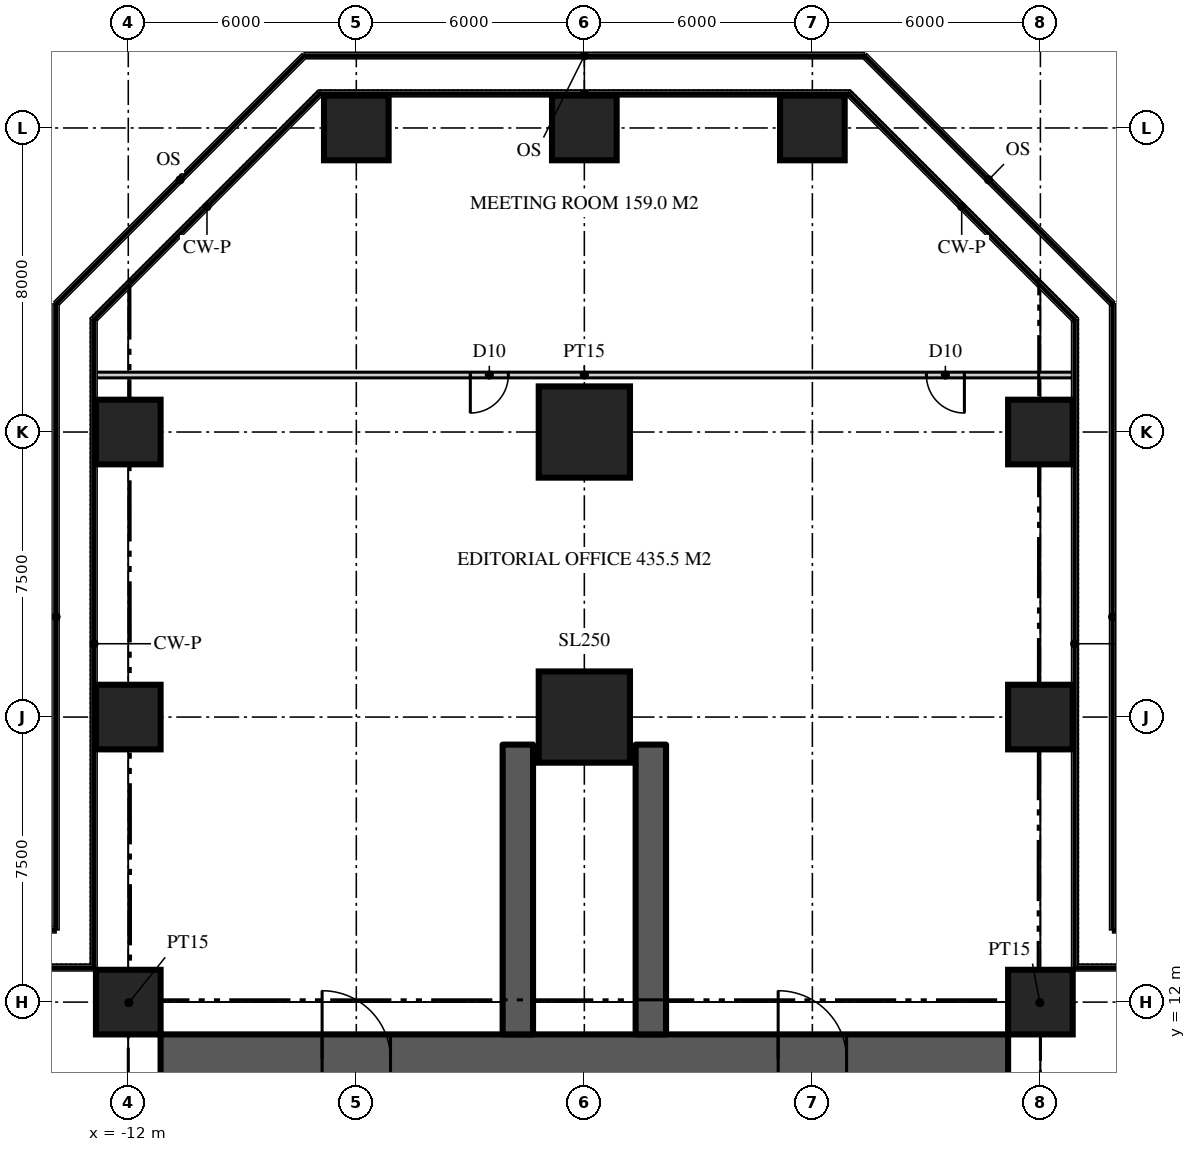
"""IFC4 building model, lengths in metres.
Left out: names, types, materials, properties, quantities, classifications, styles, units other than length and angle.
Written with IfcOpenShell. Run it as: python <this file> out.ifc"""

import sys

from ifc_helpers import new_model, si_unit, direction, frame, frame_2d, origin, origin_2d, place, context, subcontext, project, spatial, rectangle, extrude, element, fill, save


model = new_model("IFC4")
c1 = context("Model", 3, precision=1e-05, world=origin(), true_north=direction((0.0, 1.0)))
c2 = subcontext(c1, "Body", "Model", "MODEL_VIEW")
j1 = project(units=[si_unit("LENGTHUNIT", "METRE"), si_unit("PLANEANGLEUNIT", "RADIAN")], contexts=[c1])
p1 = place(None, origin())
s1 = spatial("IfcSite", under=j1, at=p1, CompositionType="ELEMENT")
p2 = place(p1, origin())
s2 = spatial("IfcBuilding", under=s1, at=p2, CompositionType="ELEMENT")
p3 = place(p2, frame((0.0, 0.0, 28.0)))
s3 = spatial("IfcBuildingStorey", under=s2, at=p3, CompositionType="ELEMENT", Elevation=28.0)
p4 = place(p3, frame((-11.15, 10.5, 0.0), z_axis=(0.0, 0.0, 1.0), x_axis=(1.0, 0.0, 0.0)))
e1 = element("IfcWall", 1, at=p4, inside=s3, PredefinedType="SHEAR", context=c2, shape_type="SweptSolid", body=[
    extrude(rectangle(XDim=22.3, YDim=1.3, at=frame_2d((11.15, 0.0))), origin(), (0.0, 0.0, 1.0), 5.0),
])
p5 = place(p4, frame((4.25, 0.0, 0.0)))
e2 = element("IfcOpeningElement", 2, at=p5, cuts=e1, PredefinedType="OPENING", context=c2, shape_type="SweptSolid", body=[
    extrude(rectangle(XDim=1.8, YDim=2.2, at=frame_2d((0.9, 1.1))), frame((0.0, 0.66, 0.0), z_axis=(0.0, -1.0, 0.0), x_axis=(1.0, 0.0, 0.0)), (0.0, 0.0, 1.0), 1.32),
])
p6 = place(p4, frame((16.25, 0.0, 0.0)))
e3 = element("IfcOpeningElement", 3, at=p6, cuts=e1, PredefinedType="OPENING", context=c2, shape_type="SweptSolid", body=[
    extrude(rectangle(XDim=1.8, YDim=2.2, at=frame_2d((0.9, 1.1))), frame((0.0, 0.66, 0.0), z_axis=(0.0, -1.0, 0.0), x_axis=(1.0, 0.0, 0.0)), (0.0, 0.0, 1.0), 1.32),
])
for number, where, z_axis, x_axis in (
    (4, (1.75, 11.15, 0.0), (0.0, 0.0, 1.0), (0.0, 1.0, 0.0)),
    (5, (-1.75, 11.15, 0.0), (0.0, 0.0, 1.0), (0.0, 1.0, 0.0)),
):
    element("IfcWall", number, at=place(p3, frame(where, z_axis=z_axis, x_axis=x_axis)), inside=s3, PredefinedType="SHEAR", context=c2, shape_type="SweptSolid", body=[
        extrude(rectangle(XDim=7.625, YDim=0.8, at=frame_2d((3.812, 0.0))), origin(), (0.0, 0.0, 1.0), 5.0),
    ])
for number, where, z_axis, x_axis in (
    (6, (-12.0, 12.0, 0.0), (0.0, 0.0, 1.0), (1.0, 0.0, 0.0)),
    (7, (12.0, 12.0, 0.0), (0.0, 0.0, 1.0), (1.0, 0.0, 0.0)),
    (8, (-12.0, 19.5, 0.0), (0.0, 0.0, 1.0), (1.0, 0.0, 0.0)),
):
    element("IfcColumn", number, at=place(p3, frame(where, z_axis=z_axis, x_axis=x_axis)), inside=s3, PredefinedType="COLUMN", context=c2, shape_type="SweptSolid", body=[
        extrude(rectangle(XDim=1.7, YDim=1.7, at=origin_2d()), origin(), (0.0, 0.0, 1.0), 5.0),
    ])
p7 = place(p3, frame((0.0, 19.5, 0.0), z_axis=(0.0, 0.0, 1.0), x_axis=(1.0, 0.0, 0.0)))
e9 = element("IfcColumn", 9, at=p7, inside=s3, PredefinedType="COLUMN", context=c2, shape_type="SweptSolid", body=[
    extrude(rectangle(XDim=2.4, YDim=2.4, at=origin_2d()), origin(), (0.0, 0.0, 1.0), 5.0),
])
for number, where, z_axis, x_axis in (
    (10, (12.0, 19.5, 0.0), (0.0, 0.0, 1.0), (1.0, 0.0, 0.0)),
    (11, (-12.0, 27.0, 0.0), (0.0, 0.0, 1.0), (1.0, 0.0, 0.0)),
):
    element("IfcColumn", number, at=place(p3, frame(where, z_axis=z_axis, x_axis=x_axis)), inside=s3, PredefinedType="COLUMN", context=c2, shape_type="SweptSolid", body=[
        extrude(rectangle(XDim=1.7, YDim=1.7, at=origin_2d()), origin(), (0.0, 0.0, 1.0), 5.0),
    ])
p8 = place(p3, frame((0.0, 27.0, 0.0), z_axis=(0.0, 0.0, 1.0), x_axis=(1.0, 0.0, 0.0)))
e12 = element("IfcColumn", 12, at=p8, inside=s3, PredefinedType="COLUMN", context=c2, shape_type="SweptSolid", body=[
    extrude(rectangle(XDim=2.4, YDim=2.4, at=origin_2d()), origin(), (0.0, 0.0, 1.0), 5.0),
])
for number, where, z_axis, x_axis in (
    (13, (12.0, 27.0, 0.0), (0.0, 0.0, 1.0), (1.0, 0.0, 0.0)),
    (14, (-6.0, 35.0, 0.0), (0.0, 0.0, 1.0), (1.0, 0.0, 0.0)),
    (15, (0.0, 35.0, 0.0), (0.0, 0.0, 1.0), (1.0, 0.0, 0.0)),
    (16, (6.0, 35.0, 0.0), (0.0, 0.0, 1.0), (1.0, 0.0, 0.0)),
):
    element("IfcColumn", number, at=place(p3, frame(where, z_axis=z_axis, x_axis=x_axis)), inside=s3, PredefinedType="COLUMN", context=c2, shape_type="SweptSolid", body=[
        extrude(rectangle(XDim=1.7, YDim=1.7, at=origin_2d()), origin(), (0.0, 0.0, 1.0), 5.0),
    ])
p9 = place(p3, frame((12.875, 28.5, 0.0), z_axis=(0.0, 0.0, 1.0), x_axis=(-1.0, 0.0, 0.0)))
e17 = element("IfcWall", 17, at=p9, inside=s3, PredefinedType="PARTITIONING", context=c2, shape_type="SweptSolid", body=[
    extrude(rectangle(XDim=25.75, YDim=0.15, at=frame_2d((12.875, 0.0))), origin(), (0.0, 0.0, 1.0), 4.75),
])
p10 = place(p9, frame((14.875, 0.0, 0.0)))
e18 = element("IfcOpeningElement", 18, at=p10, cuts=e17, PredefinedType="OPENING", context=c2, shape_type="SweptSolid", body=[
    extrude(rectangle(XDim=1.0, YDim=2.2, at=frame_2d((0.5, 1.1))), frame((0.0, 0.085, 0.0), z_axis=(0.0, -1.0, 0.0), x_axis=(1.0, 0.0, 0.0)), (0.0, 0.0, 1.0), 0.17),
])
p11 = place(p9, frame((2.875, 0.0, 0.0)))
e19 = element("IfcOpeningElement", 19, at=p11, cuts=e17, PredefinedType="OPENING", context=c2, shape_type="SweptSolid", body=[
    extrude(rectangle(XDim=1.0, YDim=2.2, at=frame_2d((0.5, 1.1))), frame((0.0, 0.085, 0.0), z_axis=(0.0, -1.0, 0.0), x_axis=(1.0, 0.0, 0.0)), (0.0, 0.0, 1.0), 0.17),
])
for number, where, z_axis, x_axis in (
    (20, (11.15, 11.15, 0.0), (0.0, 0.0, 1.0), (0.707, 0.707, 0.0)),
    (21, (-11.15, 11.15, 0.0), (0.0, 0.0, 1.0), (-0.707, 0.707, 0.0)),
):
    element("IfcWall", number, at=place(p3, frame(where, z_axis=z_axis, x_axis=x_axis)), inside=s3, PredefinedType="PARTITIONING", context=c2, shape_type="SweptSolid", body=[
        extrude(rectangle(XDim=2.362, YDim=0.15, at=frame_2d((1.181, 0.0))), origin(), (0.0, 0.0, 1.0), 4.75),
    ])
p12 = place(p5, origin())
e22 = element("IfcDoor", 22, at=p12, inside=s3, OperationType="DOUBLE_DOOR_DOUBLE_SWING", PredefinedType="DOOR", context=c2, shape_type="SweptSolid", body=[
    extrude(rectangle(XDim=1.8, YDim=2.2, at=frame_2d((0.9, 1.1))), frame((0.0, 0.025, 0.0), z_axis=(0.0, -1.0, 0.0), x_axis=(1.0, 0.0, 0.0)), (0.0, 0.0, 1.0), 0.05),
])
fill(e2, e22)
p13 = place(p6, origin())
e23 = element("IfcDoor", 23, at=p13, inside=s3, OperationType="DOUBLE_DOOR_DOUBLE_SWING", PredefinedType="DOOR", context=c2, shape_type="SweptSolid", body=[
    extrude(rectangle(XDim=1.8, YDim=2.2, at=frame_2d((0.9, 1.1))), frame((0.0, 0.025, 0.0), z_axis=(0.0, -1.0, 0.0), x_axis=(1.0, 0.0, 0.0)), (0.0, 0.0, 1.0), 0.05),
])
fill(e3, e23)
p14 = place(p10, origin())
e24 = element("IfcDoor", 24, at=p14, inside=s3, OperationType="SINGLE_SWING_RIGHT", PredefinedType="DOOR", context=c2, shape_type="SweptSolid", body=[
    extrude(rectangle(XDim=1.0, YDim=2.2, at=frame_2d((0.5, 1.1))), frame((0.0, 0.025, 0.0), z_axis=(0.0, -1.0, 0.0), x_axis=(1.0, 0.0, 0.0)), (0.0, 0.0, 1.0), 0.05),
])
fill(e18, e24)
p15 = place(p11, origin())
e25 = element("IfcDoor", 25, at=p15, inside=s3, OperationType="SINGLE_SWING_LEFT", PredefinedType="DOOR", context=c2, shape_type="SweptSolid", body=[
    extrude(rectangle(XDim=1.0, YDim=2.2, at=frame_2d((0.5, 1.1))), frame((0.0, 0.025, 0.0), z_axis=(0.0, -1.0, 0.0), x_axis=(1.0, 0.0, 0.0)), (0.0, 0.0, 1.0), 0.05),
])
fill(e19, e25)
save(model, sys.argv[1])
